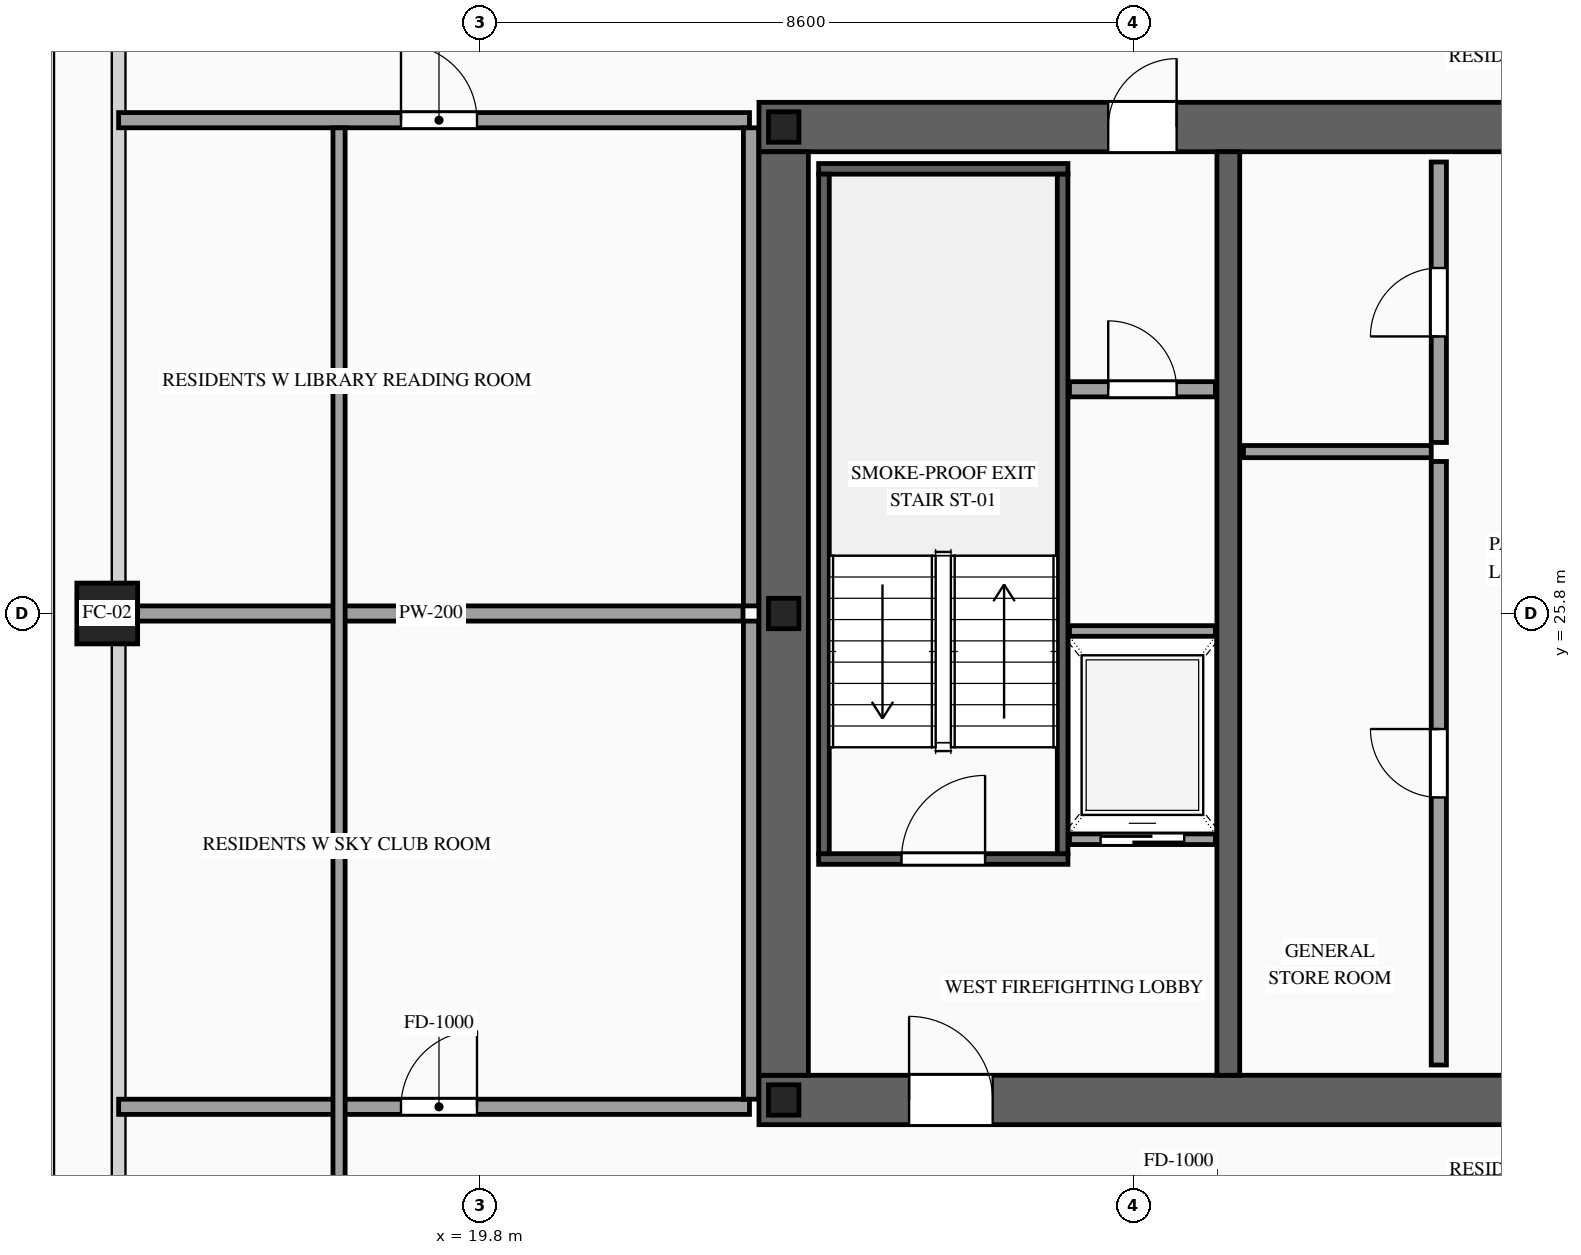
"""IFC4 building model, lengths in metres.
Left out: names, types, materials, properties, quantities, classifications, styles, units other than length and angle.
Written with IfcOpenShell. Run it as: python <this file> out.ifc"""

import sys

from ifc_helpers import new_model, si_unit, direction, frame, frame_2d, origin, origin_2d, place, context, subcontext, project, spatial, rectangle, hollow_rectangle, i_section, extrude, source, transform, mapped, element, fill, save


model = new_model("IFC4")
c1 = context("Model", 3, precision=1e-05, world=origin(), true_north=direction((0.0, 1.0)))
c2 = subcontext(c1, "Body", "Model", "MODEL_VIEW")
j1 = project(units=[si_unit("LENGTHUNIT", "METRE"), si_unit("PLANEANGLEUNIT", "RADIAN")], contexts=[c1])
p1 = place(None, origin())
s1 = spatial("IfcSite", under=j1, at=p1, CompositionType="ELEMENT")
p2 = place(p1, origin())
s2 = spatial("IfcBuilding", under=s1, at=p2, CompositionType="ELEMENT")
p3 = place(p2, frame((0.0, 0.0, 198.5)))
s3 = spatial("IfcBuildingStorey", under=s2, at=p3, CompositionType="ELEMENT", Elevation=198.5)
p4 = place(p3, frame((23.475, 19.4, 0.0), z_axis=(0.0, 0.0, 1.0), x_axis=(1.0, 0.0, 0.0)))
e1 = element("IfcWall", 1, at=p4, inside=s3, PredefinedType="SHEAR", context=c2, shape_type="SweptSolid", body=[
    extrude(rectangle(XDim=27.05, YDim=0.65, at=frame_2d((13.525, 0.0))), origin(), (0.0, 0.0, 1.0), 3.5),
])
p5 = place(p4, frame((1.975, 0.0, 0.0)))
e2 = element("IfcOpeningElement", 2, at=p5, cuts=e1, PredefinedType="OPENING", context=c2, shape_type="SweptSolid", body=[
    extrude(rectangle(XDim=1.1, YDim=2.2, at=frame_2d((0.55, 1.1))), frame((0.0, 0.34, 0.0), z_axis=(0.0, -1.0, 0.0), x_axis=(1.0, 0.0, 0.0)), (0.0, 0.0, 1.0), 0.68),
])
p6 = place(p4, frame((9.875, 0.0, 0.0)))
e3 = element("IfcOpeningElement", 3, at=p6, cuts=e1, PredefinedType="OPENING", context=c2, shape_type="SweptSolid", body=[
    extrude(rectangle(XDim=1.1, YDim=2.2, at=frame_2d((0.55, 1.1))), frame((0.0, 0.34, 0.0), z_axis=(0.0, -1.0, 0.0), x_axis=(1.0, 0.0, 0.0)), (0.0, 0.0, 1.0), 0.68),
])
p7 = place(p4, frame((23.075, 0.0, 0.0)))
e4 = element("IfcOpeningElement", 4, at=p7, cuts=e1, PredefinedType="OPENING", context=c2, shape_type="SweptSolid", body=[
    extrude(rectangle(XDim=1.1, YDim=2.2, at=frame_2d((0.55, 1.1))), frame((0.0, 0.34, 0.0), z_axis=(0.0, -1.0, 0.0), x_axis=(1.0, 0.0, 0.0)), (0.0, 0.0, 1.0), 0.68),
])
p8 = place(p4, frame((19.695, 0.0, 0.0)))
e5 = element("IfcOpeningElement", 5, at=p8, cuts=e1, PredefinedType="OPENING", context=c2, shape_type="SweptSolid", body=[
    extrude(rectangle(XDim=0.9, YDim=2.15, at=frame_2d((0.45, 1.075))), frame((0.0, 0.34, 0.0), z_axis=(0.0, -1.0, 0.0), x_axis=(1.0, 0.0, 0.0)), (0.0, 0.0, 1.0), 0.68),
])
p9 = place(p4, frame((18.255, 0.0, 0.0)))
e6 = element("IfcOpeningElement", 6, at=p9, cuts=e1, PredefinedType="OPENING", context=c2, shape_type="SweptSolid", body=[
    extrude(rectangle(XDim=0.9, YDim=2.15, at=frame_2d((0.45, 1.075))), frame((0.0, 0.34, 0.0), z_axis=(0.0, -1.0, 0.0), x_axis=(1.0, 0.0, 0.0)), (0.0, 0.0, 1.0), 0.68),
])
p10 = place(p3, frame((23.475, 32.2, 0.0), z_axis=(0.0, 0.0, 1.0), x_axis=(1.0, 0.0, 0.0)))
e7 = element("IfcWall", 7, at=p10, inside=s3, PredefinedType="SHEAR", context=c2, shape_type="SweptSolid", body=[
    extrude(rectangle(XDim=27.05, YDim=0.65, at=frame_2d((13.525, 0.0))), origin(), (0.0, 0.0, 1.0), 3.5),
])
p11 = place(p10, frame((4.595, 0.0, 0.0)))
e8 = element("IfcOpeningElement", 8, at=p11, cuts=e7, PredefinedType="OPENING", context=c2, shape_type="SweptSolid", body=[
    extrude(rectangle(XDim=0.9, YDim=2.15, at=frame_2d((0.45, 1.075))), frame((0.0, 0.34, 0.0), z_axis=(0.0, -1.0, 0.0), x_axis=(1.0, 0.0, 0.0)), (0.0, 0.0, 1.0), 0.68),
])
p12 = place(p10, frame((9.875, 0.0, 0.0)))
e9 = element("IfcOpeningElement", 9, at=p12, cuts=e7, PredefinedType="OPENING", context=c2, shape_type="SweptSolid", body=[
    extrude(rectangle(XDim=1.1, YDim=2.2, at=frame_2d((0.55, 1.1))), frame((0.0, 0.34, 0.0), z_axis=(0.0, -1.0, 0.0), x_axis=(1.0, 0.0, 0.0)), (0.0, 0.0, 1.0), 0.68),
])
p13 = place(p10, frame((15.725, 0.0, 0.0)))
e10 = element("IfcOpeningElement", 10, at=p13, cuts=e7, PredefinedType="OPENING", context=c2, shape_type="SweptSolid", body=[
    extrude(rectangle(XDim=1.1, YDim=2.2, at=frame_2d((0.55, 1.1))), frame((0.0, 0.34, 0.0), z_axis=(0.0, -1.0, 0.0), x_axis=(1.0, 0.0, 0.0)), (0.0, 0.0, 1.0), 0.68),
])
p14 = place(p10, frame((18.255, 0.0, 0.0)))
e11 = element("IfcOpeningElement", 11, at=p14, cuts=e7, PredefinedType="OPENING", context=c2, shape_type="SweptSolid", body=[
    extrude(rectangle(XDim=0.9, YDim=2.15, at=frame_2d((0.45, 1.075))), frame((0.0, 0.34, 0.0), z_axis=(0.0, -1.0, 0.0), x_axis=(1.0, 0.0, 0.0)), (0.0, 0.0, 1.0), 0.68),
])
p15 = place(p10, frame((19.695, 0.0, 0.0)))
e12 = element("IfcOpeningElement", 12, at=p15, cuts=e7, PredefinedType="OPENING", context=c2, shape_type="SweptSolid", body=[
    extrude(rectangle(XDim=0.9, YDim=2.15, at=frame_2d((0.45, 1.075))), frame((0.0, 0.34, 0.0), z_axis=(0.0, -1.0, 0.0), x_axis=(1.0, 0.0, 0.0)), (0.0, 0.0, 1.0), 0.68),
])
m1 = source(origin(), c2, "Body", "SweptSolid", [
    extrude(rectangle(XDim=12.15, YDim=0.65, at=frame_2d((6.075, 0.0))), origin(), (0.0, 0.0, 1.0), 3.5),
])
p16 = place(p3, frame((23.8, 19.725, 0.0), z_axis=(0.0, 0.0, 1.0), x_axis=(0.0, 1.0, 0.0)))
e13 = element("IfcWall", 13, at=p16, inside=s3, PredefinedType="SHEAR", context=c2, shape_type="MappedRepresentation", body=[
    mapped(m1, transform((0.0, 0.0, 0.0), scale=1.0)),
])
m2 = source(origin(), c2, "Body", "SweptSolid", [
    extrude(rectangle(XDim=12.15, YDim=0.3, at=frame_2d((6.075, 0.0))), origin(), (0.0, 0.0, 1.0), 3.5),
])
p17 = place(p3, frame((29.65, 19.725, 0.0), z_axis=(0.0, 0.0, 1.0), x_axis=(0.0, 1.0, 0.0)))
e14 = element("IfcWall", 14, at=p17, inside=s3, PredefinedType="SOLIDWALL", context=c2, shape_type="MappedRepresentation", body=[
    mapped(m2, transform((0.0, 0.0, 0.0), scale=1.0)),
])
m3 = source(origin(), c2, "Body", "SweptSolid", [
    extrude(i_section(OverallWidth=0.4, OverallDepth=0.4, WebThickness=0.013, FlangeThickness=0.021, at=origin_2d()), origin(), (0.0, 0.0, 1.0), 3.5),
])
for number, where, z_axis, x_axis in (
    (15, (23.8, 19.4, 0.0), (0.0, 0.0, 1.0), (1.0, 0.0, 0.0)),
    (16, (23.8, 25.8, 0.0), (0.0, 0.0, 1.0), (1.0, 0.0, 0.0)),
    (17, (23.8, 32.2, 0.0), (0.0, 0.0, 1.0), (1.0, 0.0, 0.0)),
):
    element("IfcColumn", number, at=place(p3, frame(where, z_axis=z_axis, x_axis=x_axis)), inside=s3, PredefinedType="COLUMN", context=c2, shape_type="MappedRepresentation", body=[
        mapped(m3, transform((0.0, 0.0, 0.0), scale=1.0)),
    ])
m4 = source(origin(), c2, "Body", "SweptSolid", [
    extrude(hollow_rectangle(XDim=0.8, YDim=0.8, WallThickness=0.036, at=origin_2d()), origin(), (0.0, 0.0, 1.0), 3.5),
])
p18 = place(p3, frame((14.9, 25.8, 0.0), z_axis=(0.0, 0.0, 1.0), x_axis=(1.0, 0.0, 0.0)))
e18 = element("IfcColumn", 18, at=p18, inside=s3, PredefinedType="COLUMN", context=c2, shape_type="MappedRepresentation", body=[
    mapped(m4, transform((0.0, 0.0, 0.0), scale=1.0)),
])
p19 = place(p3, frame((27.56, 22.83, 0.0), z_axis=(0.0, 0.0, 1.0), x_axis=(1.0, 0.0, 0.0)))
e19 = element("IfcWall", 19, at=p19, inside=s3, PredefinedType="SOLIDWALL", context=c2, shape_type="SweptSolid", body=[
    extrude(rectangle(XDim=1.92, YDim=0.14, at=frame_2d((0.96, 0.0))), origin(), (0.0, 0.0, 1.0), 3.28),
])
p20 = place(p19, frame((0.41, 0.0, 0.0)))
e20 = element("IfcOpeningElement", 20, at=p20, cuts=e19, PredefinedType="OPENING", context=c2, shape_type="SweptSolid", body=[
    extrude(rectangle(XDim=1.1, YDim=2.2, at=frame_2d((0.55, 1.1))), frame((0.0, 0.085, 0.0), z_axis=(0.0, -1.0, 0.0), x_axis=(1.0, 0.0, 0.0)), (0.0, 0.0, 1.0), 0.17),
])
m5 = source(origin(), c2, "Body", "SweptSolid", [
    extrude(rectangle(XDim=1.92, YDim=0.14, at=frame_2d((0.96, 0.0))), origin(), (0.0, 0.0, 1.0), 3.28),
])
p21 = place(p3, frame((27.56, 25.57, 0.0), z_axis=(0.0, 0.0, 1.0), x_axis=(1.0, 0.0, 0.0)))
e21 = element("IfcWall", 21, at=p21, inside=s3, PredefinedType="SOLIDWALL", context=c2, shape_type="MappedRepresentation", body=[
    mapped(m5, transform((0.0, 0.0, 0.0), scale=1.0)),
])
p22 = place(p3, frame((24.26, 22.57, 0.0), z_axis=(0.0, 0.0, 1.0), x_axis=(1.0, 0.0, 0.0)))
e22 = element("IfcWall", 22, at=p22, inside=s3, PredefinedType="SOLIDWALL", context=c2, shape_type="SweptSolid", body=[
    extrude(rectangle(XDim=3.28, YDim=0.14, at=frame_2d((1.64, 0.0))), origin(), (0.0, 0.0, 1.0), 3.28),
])
p23 = place(p22, frame((1.09, 0.0, 0.0)))
e23 = element("IfcOpeningElement", 23, at=p23, cuts=e22, PredefinedType="OPENING", context=c2, shape_type="SweptSolid", body=[
    extrude(rectangle(XDim=1.1, YDim=2.2, at=frame_2d((0.55, 1.1))), frame((0.0, 0.085, 0.0), z_axis=(0.0, -1.0, 0.0), x_axis=(1.0, 0.0, 0.0)), (0.0, 0.0, 1.0), 0.17),
])
m6 = source(origin(), c2, "Body", "SweptSolid", [
    extrude(rectangle(XDim=3.28, YDim=0.14, at=frame_2d((1.64, 0.0))), origin(), (0.0, 0.0, 1.0), 3.28),
])
p24 = place(p3, frame((24.26, 31.65, 0.0), z_axis=(0.0, 0.0, 1.0), x_axis=(1.0, 0.0, 0.0)))
e24 = element("IfcWall", 24, at=p24, inside=s3, PredefinedType="SOLIDWALL", context=c2, shape_type="MappedRepresentation", body=[
    mapped(m6, transform((0.0, 0.0, 0.0), scale=1.0)),
])
m7 = source(origin(), c2, "Body", "SweptSolid", [
    extrude(rectangle(XDim=8.94, YDim=0.14, at=frame_2d((4.47, 0.0))), origin(), (0.0, 0.0, 1.0), 3.28),
])
for number, where, z_axis, x_axis in (
    (25, (24.33, 22.64, 0.0), (0.0, 0.0, 1.0), (0.0, 1.0, 0.0)),
    (26, (27.47, 22.64, 0.0), (0.0, 0.0, 1.0), (0.0, 1.0, 0.0)),
):
    element("IfcWall", number, at=place(p3, frame(where, z_axis=z_axis, x_axis=x_axis)), inside=s3, PredefinedType="SOLIDWALL", context=c2, shape_type="MappedRepresentation", body=[
        mapped(m7, transform((0.0, 0.0, 0.0), scale=1.0)),
    ])
p25 = place(p3, frame((27.56, 28.75, 0.0), z_axis=(0.0, 0.0, 1.0), x_axis=(1.0, 0.0, 0.0)))
e27 = element("IfcWall", 27, at=p25, inside=s3, PredefinedType="PARTITIONING", context=c2, shape_type="SweptSolid", body=[
    extrude(rectangle(XDim=1.92, YDim=0.2, at=frame_2d((0.96, 0.0))), origin(), (0.0, 0.0, 1.0), 3.28),
])
p26 = place(p25, frame((0.51, 0.0, 0.0)))
e28 = element("IfcOpeningElement", 28, at=p26, cuts=e27, PredefinedType="OPENING", context=c2, shape_type="SweptSolid", body=[
    extrude(rectangle(XDim=0.9, YDim=2.15, at=frame_2d((0.45, 1.075))), frame((0.0, 0.115, 0.0), z_axis=(0.0, -1.0, 0.0), x_axis=(1.0, 0.0, 0.0)), (0.0, 0.0, 1.0), 0.23),
])
p27 = place(p3, frame((32.42, 19.86, 0.0), z_axis=(0.0, 0.0, 1.0), x_axis=(0.0, 1.0, 0.0)))
e29 = element("IfcWall", 29, at=p27, inside=s3, PredefinedType="PARTITIONING", context=c2, shape_type="SweptSolid", body=[
    extrude(rectangle(XDim=7.94, YDim=0.2, at=frame_2d((3.97, 0.0))), origin(), (0.0, 0.0, 1.0), 3.28),
])
p28 = place(p27, frame((3.52, 0.0, 0.0)))
e30 = element("IfcOpeningElement", 30, at=p28, cuts=e29, PredefinedType="OPENING", context=c2, shape_type="SweptSolid", body=[
    extrude(rectangle(XDim=0.9, YDim=2.15, at=frame_2d((0.45, 1.075))), frame((0.0, 0.115, 0.0), z_axis=(0.0, -1.0, 0.0), x_axis=(1.0, 0.0, 0.0)), (0.0, 0.0, 1.0), 0.23),
])
p29 = place(p3, frame((32.42, 28.05, 0.0), z_axis=(0.0, 0.0, 1.0), x_axis=(0.0, 1.0, 0.0)))
e31 = element("IfcWall", 31, at=p29, inside=s3, PredefinedType="PARTITIONING", context=c2, shape_type="SweptSolid", body=[
    extrude(rectangle(XDim=3.69, YDim=0.2, at=frame_2d((1.845, 0.0))), origin(), (0.0, 0.0, 1.0), 3.28),
])
p30 = place(p29, frame((1.395, 0.0, 0.0)))
e32 = element("IfcOpeningElement", 32, at=p30, cuts=e31, PredefinedType="OPENING", context=c2, shape_type="SweptSolid", body=[
    extrude(rectangle(XDim=0.9, YDim=2.15, at=frame_2d((0.45, 1.075))), frame((0.0, 0.115, 0.0), z_axis=(0.0, -1.0, 0.0), x_axis=(1.0, 0.0, 0.0)), (0.0, 0.0, 1.0), 0.23),
])
m8 = source(origin(), c2, "Body", "SweptSolid", [
    extrude(rectangle(XDim=2.47, YDim=0.16, at=frame_2d((1.235, 0.0))), origin(), (0.0, 0.0, 1.0), 3.28),
])
p31 = place(p3, frame((29.85, 27.93, 0.0), z_axis=(0.0, 0.0, 1.0), x_axis=(1.0, 0.0, 0.0)))
e33 = element("IfcWall", 33, at=p31, inside=s3, PredefinedType="PARTITIONING", context=c2, shape_type="MappedRepresentation", body=[
    mapped(m8, transform((0.0, 0.0, 0.0), scale=1.0)),
])
p32 = place(p3, frame((15.05, 19.31, 0.0), z_axis=(0.0, 0.0, 1.0), x_axis=(1.0, 0.0, 0.0)))
e34 = element("IfcWall", 34, at=p32, inside=s3, PredefinedType="PARTITIONING", context=c2, shape_type="SweptSolid", body=[
    extrude(rectangle(XDim=8.3, YDim=0.2, at=frame_2d((4.15, 0.0))), origin(), (0.0, 0.0, 1.0), 2.775),
])
p33 = place(p32, frame((3.715, 0.0, 0.0)))
e35 = element("IfcOpeningElement", 35, at=p33, cuts=e34, PredefinedType="OPENING", context=c2, shape_type="SweptSolid", body=[
    extrude(rectangle(XDim=1.0, YDim=2.2, at=frame_2d((0.5, 1.1))), frame((0.0, 0.115, 0.0), z_axis=(0.0, -1.0, 0.0), x_axis=(1.0, 0.0, 0.0)), (0.0, 0.0, 1.0), 0.23),
])
m9 = source(origin(), c2, "Body", "SweptSolid", [
    extrude(rectangle(XDim=8.215, YDim=0.2, at=frame_2d((4.107, 0.0))), origin(), (0.0, 0.0, 1.0), 2.687),
])
p34 = place(p3, frame((15.05, 25.8, 0.0), z_axis=(0.0, 0.0, 1.0), x_axis=(1.0, 0.0, 0.0)))
e36 = element("IfcWall", 36, at=p34, inside=s3, PredefinedType="PARTITIONING", context=c2, shape_type="MappedRepresentation", body=[
    mapped(m9, transform((0.0, 0.0, 0.0), scale=1.0)),
])
m10 = source(origin(), c2, "Body", "SweptSolid", [
    extrude(rectangle(XDim=6.29, YDim=0.2, at=frame_2d((3.145, 0.0))), origin(), (0.0, 0.0, 1.0), 3.28),
])
p35 = place(p3, frame((23.37, 19.41, 0.0), z_axis=(0.0, 0.0, 1.0), x_axis=(0.0, 1.0, 0.0)))
e37 = element("IfcWall", 37, at=p35, inside=s3, PredefinedType="PARTITIONING", context=c2, shape_type="MappedRepresentation", body=[
    mapped(m10, transform((0.0, 0.0, 0.0), scale=1.0)),
])
p36 = place(p3, frame((15.05, 32.29, 0.0), z_axis=(0.0, 0.0, 1.0), x_axis=(1.0, 0.0, 0.0)))
e38 = element("IfcWall", 38, at=p36, inside=s3, PredefinedType="PARTITIONING", context=c2, shape_type="SweptSolid", body=[
    extrude(rectangle(XDim=8.3, YDim=0.2, at=frame_2d((4.15, 0.0))), origin(), (0.0, 0.0, 1.0), 2.775),
])
p37 = place(p36, frame((3.715, 0.0, 0.0)))
e39 = element("IfcOpeningElement", 39, at=p37, cuts=e38, PredefinedType="OPENING", context=c2, shape_type="SweptSolid", body=[
    extrude(rectangle(XDim=1.0, YDim=2.2, at=frame_2d((0.5, 1.1))), frame((0.0, 0.115, 0.0), z_axis=(0.0, -1.0, 0.0), x_axis=(1.0, 0.0, 0.0)), (0.0, 0.0, 1.0), 0.23),
])
m11 = source(origin(), c2, "Body", "SweptSolid", [
    extrude(rectangle(XDim=28.19, YDim=0.16, at=frame_2d((14.095, 0.0))), origin(), (0.0, 0.0, 1.0), 3.28),
])
p38 = place(p3, frame((17.95, 4.0, 0.0), z_axis=(0.0, 0.0, 1.0), x_axis=(0.0, 1.0, 0.0)))
e40 = element("IfcWall", 40, at=p38, inside=s3, PredefinedType="PARTITIONING", context=c2, shape_type="MappedRepresentation", body=[
    mapped(m11, transform((0.0, 0.0, 0.0), scale=1.0)),
])
p39 = place(p3, frame((23.37, 25.9, 0.0), z_axis=(0.0, 0.0, 1.0), x_axis=(0.0, 1.0, 0.0)))
e41 = element("IfcWall", 41, at=p39, inside=s3, PredefinedType="PARTITIONING", context=c2, shape_type="MappedRepresentation", body=[
    mapped(m10, transform((0.0, 0.0, 0.0), scale=1.0)),
])
m12 = source(origin(), c2, "Body", "SweptSolid", [
    extrude(rectangle(XDim=1.1, YDim=2.2, at=frame_2d((0.55, 1.1))), frame((0.0, 0.025, 0.0), z_axis=(0.0, -1.0, 0.0), x_axis=(1.0, 0.0, 0.0)), (0.0, 0.0, 1.0), 0.05),
])
p40 = place(p20, origin())
e42 = element("IfcDoor", 42, at=p40, inside=s3, OperationType="SLIDING_TO_LEFT", PredefinedType="DOOR", context=c2, shape_type="MappedRepresentation", body=[
    mapped(m12, transform((0.0, 0.0, 0.0), scale=1.0)),
])
fill(e20, e42)
m13 = source(origin(), c2, "Body", "SweptSolid", [
    extrude(rectangle(XDim=1.1, YDim=2.2, at=frame_2d((0.55, 1.1))), frame((0.0, 0.025, 0.0), z_axis=(0.0, -1.0, 0.0), x_axis=(1.0, 0.0, 0.0)), (0.0, 0.0, 1.0), 0.05),
])
p41 = place(p23, origin())
e43 = element("IfcDoor", 43, at=p41, inside=s3, OperationType="SINGLE_SWING_RIGHT", PredefinedType="DOOR", context=c2, shape_type="MappedRepresentation", body=[
    mapped(m13, transform((0.0, 0.0, 0.0), scale=1.0)),
])
fill(e23, e43)
p42 = place(p5, origin())
e44 = element("IfcDoor", 44, at=p42, inside=s3, OperationType="SINGLE_SWING_LEFT", PredefinedType="DOOR", context=c2, shape_type="MappedRepresentation", body=[
    mapped(m13, transform((0.0, 0.0, 0.0), scale=1.0)),
])
fill(e2, e44)
m14 = source(origin(), c2, "Body", "SweptSolid", [
    extrude(rectangle(XDim=0.9, YDim=2.15, at=frame_2d((0.45, 1.075))), frame((0.0, 0.025, 0.0), z_axis=(0.0, -1.0, 0.0), x_axis=(1.0, 0.0, 0.0)), (0.0, 0.0, 1.0), 0.05),
])
p43 = place(p11, origin())
e45 = element("IfcDoor", 45, at=p43, inside=s3, OperationType="SINGLE_SWING_RIGHT", PredefinedType="DOOR", context=c2, shape_type="MappedRepresentation", body=[
    mapped(m14, transform((0.0, 0.0, 0.0), scale=1.0)),
])
fill(e8, e45)
p44 = place(p26, origin())
e46 = element("IfcDoor", 46, at=p44, inside=s3, OperationType="SINGLE_SWING_LEFT", PredefinedType="DOOR", context=c2, shape_type="MappedRepresentation", body=[
    mapped(m14, transform((0.0, 0.0, 0.0), scale=1.0)),
])
fill(e28, e46)
p45 = place(p28, origin())
e47 = element("IfcDoor", 47, at=p45, inside=s3, OperationType="SINGLE_SWING_RIGHT", PredefinedType="DOOR", context=c2, shape_type="MappedRepresentation", body=[
    mapped(m14, transform((0.0, 0.0, 0.0), scale=1.0)),
])
fill(e30, e47)
p46 = place(p30, origin())
e48 = element("IfcDoor", 48, at=p46, inside=s3, OperationType="SINGLE_SWING_LEFT", PredefinedType="DOOR", context=c2, shape_type="MappedRepresentation", body=[
    mapped(m14, transform((0.0, 0.0, 0.0), scale=1.0)),
])
fill(e32, e48)
m15 = source(origin(), c2, "Body", "SweptSolid", [
    extrude(rectangle(XDim=1.0, YDim=2.2, at=frame_2d((0.5, 1.1))), frame((0.0, 0.025, 0.0), z_axis=(0.0, -1.0, 0.0), x_axis=(1.0, 0.0, 0.0)), (0.0, 0.0, 1.0), 0.05),
])
p47 = place(p33, origin())
e49 = element("IfcDoor", 49, at=p47, inside=s3, OperationType="SINGLE_SWING_RIGHT", PredefinedType="DOOR", context=c2, shape_type="MappedRepresentation", body=[
    mapped(m15, transform((0.0, 0.0, 0.0), scale=1.0)),
])
fill(e35, e49)
p48 = place(p37, origin())
e50 = element("IfcDoor", 50, at=p48, inside=s3, OperationType="SINGLE_SWING_LEFT", PredefinedType="DOOR", context=c2, shape_type="MappedRepresentation", body=[
    mapped(m15, transform((0.0, 0.0, 0.0), scale=1.0)),
])
fill(e39, e50)
save(model, sys.argv[1])
